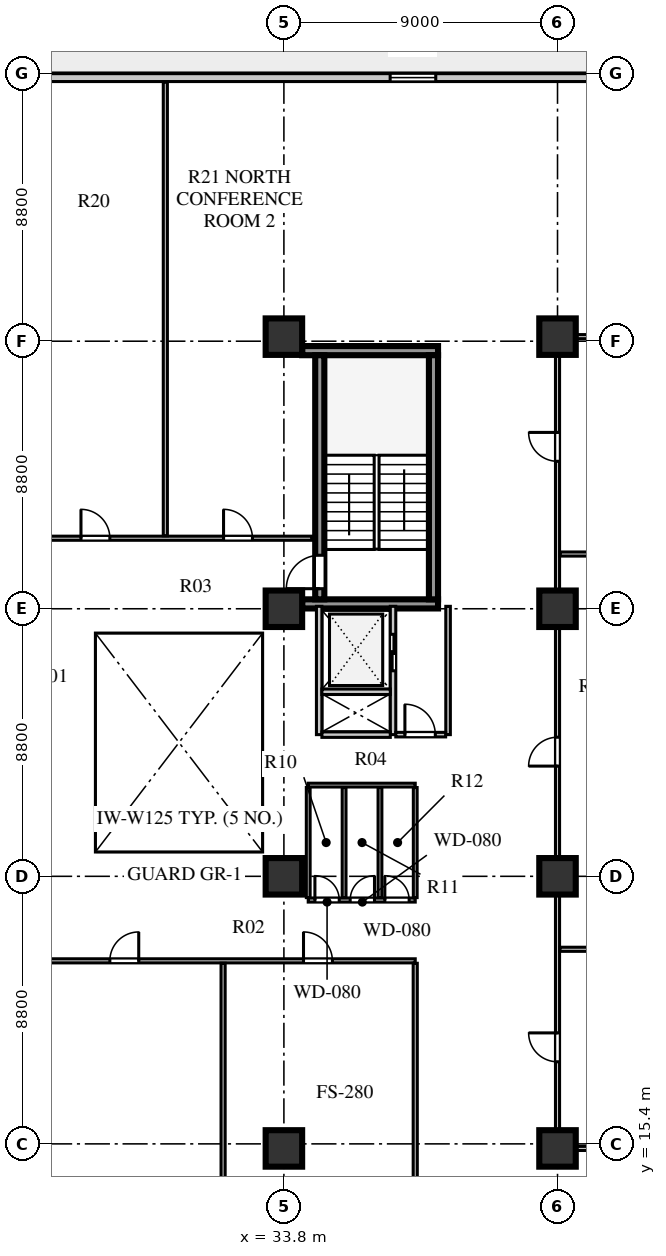
"""IFC4 building model, lengths in metres.
Left out: names, types, materials, properties, quantities, classifications, styles, units other than length and angle.
Written with IfcOpenShell. Run it as: python <this file> out.ifc"""

import sys

from ifc_helpers import new_model, si_unit, direction, frame, frame_2d, origin, origin_2d, place, context, subcontext, project, spatial, rectangle, extrude, element, fill, save


model = new_model("IFC4")
c1 = context("Model", 3, precision=1e-05, world=origin(), true_north=direction((0.0, 1.0)))
c2 = subcontext(c1, "Body", "Model", "MODEL_VIEW")
j1 = project(units=[si_unit("LENGTHUNIT", "METRE"), si_unit("PLANEANGLEUNIT", "RADIAN")], contexts=[c1])
p1 = place(None, origin())
s1 = spatial("IfcSite", under=j1, at=p1, CompositionType="ELEMENT")
p2 = place(p1, origin())
s2 = spatial("IfcBuilding", under=s1, at=p2, CompositionType="ELEMENT")
p3 = place(p2, frame((0.0, 0.0, 42.0)))
s3 = spatial("IfcBuildingStorey", under=s2, at=p3, CompositionType="ELEMENT", Elevation=42.0)
for number, where, z_axis, x_axis in (
    (1, (34.4, 33.16, 0.0), (0.0, 0.0, 1.0), (1.0, 0.0, 0.0)),
    (2, (34.4, 41.49, 0.0), (0.0, 0.0, 1.0), (1.0, 0.0, 0.0)),
):
    element("IfcWall", number, at=place(p3, frame(where, z_axis=z_axis, x_axis=x_axis)), inside=s3, PredefinedType="SHEAR", context=c2, shape_type="SweptSolid", body=[
        extrude(rectangle(XDim=4.47, YDim=0.3, at=frame_2d((2.235, 0.0))), origin(), (0.0, 0.0, 1.0), 3.72),
    ])
p4 = place(p3, frame((34.98, 33.31, 0.0), z_axis=(0.0, 0.0, 1.0), x_axis=(0.0, 1.0, 0.0)))
e3 = element("IfcWall", 3, at=p4, inside=s3, PredefinedType="SHEAR", context=c2, shape_type="SweptSolid", body=[
    extrude(rectangle(XDim=8.03, YDim=0.3, at=frame_2d((4.015, 0.0))), origin(), (0.0, 0.0, 1.0), 3.72),
])
p5 = place(p4, frame((0.35, 0.0, 0.0)))
e4 = element("IfcOpeningElement", 4, at=p5, cuts=e3, PredefinedType="OPENING", context=c2, shape_type="SweptSolid", body=[
    extrude(rectangle(XDim=1.1, YDim=2.1, at=frame_2d((0.55, 1.05))), frame((0.0, 0.16, 0.0), z_axis=(0.0, -1.0, 0.0), x_axis=(1.0, 0.0, 0.0)), (0.0, 0.0, 1.0), 0.32),
])
p6 = place(p3, frame((38.72, 33.31, 0.0), z_axis=(0.0, 0.0, 1.0), x_axis=(0.0, 1.0, 0.0)))
e5 = element("IfcWall", 5, at=p6, inside=s3, PredefinedType="SHEAR", context=c2, shape_type="SweptSolid", body=[
    extrude(rectangle(XDim=8.03, YDim=0.3, at=frame_2d((4.015, 0.0))), origin(), (0.0, 0.0, 1.0), 3.72),
])
for number, where, z_axis, x_axis in (
    (6, (33.8, 15.25, 0.0), (0.0, 0.0, 1.0), (1.0, 0.0, 0.0)),
    (7, (33.8, 24.2, 0.0), (0.0, 0.0, 1.0), (1.0, 0.0, 0.0)),
    (8, (33.8, 33.0, 0.0), (0.0, 0.0, 1.0), (1.0, 0.0, 0.0)),
    (9, (33.8, 41.95, 0.0), (0.0, 0.0, 1.0), (1.0, 0.0, 0.0)),
    (10, (42.8, 15.25, 0.0), (0.0, 0.0, 1.0), (1.0, 0.0, 0.0)),
    (11, (42.8, 24.2, 0.0), (0.0, 0.0, 1.0), (1.0, 0.0, 0.0)),
    (12, (42.8, 33.0, 0.0), (0.0, 0.0, 1.0), (1.0, 0.0, 0.0)),
    (13, (42.8, 41.95, 0.0), (0.0, 0.0, 1.0), (1.0, 0.0, 0.0)),
):
    element("IfcColumn", number, at=place(p3, frame(where, z_axis=z_axis, x_axis=x_axis)), inside=s3, PredefinedType="COLUMN", context=c2, shape_type="SweptSolid", body=[
        extrude(rectangle(XDim=1.2, YDim=1.2, at=origin_2d()), origin(), (0.0, 0.0, 1.0), 3.72),
    ])
p7 = place(p3, frame((46.3, 50.47, 0.0), z_axis=(0.0, 0.0, 1.0), x_axis=(-1.0, 0.0, 0.0)))
e14 = element("IfcWall", 14, at=p7, inside=s3, PredefinedType="SOLIDWALL", context=c2, shape_type="SweptSolid", body=[
    extrude(rectangle(XDim=34.0, YDim=0.26, at=frame_2d((17.0, 0.0))), origin(), (0.0, 0.0, 1.0), 3.72),
])
p8 = place(p7, frame((32.05, 0.0, 0.0)))
e15 = element("IfcOpeningElement", 15, at=p8, cuts=e14, PredefinedType="OPENING", context=c2, shape_type="SweptSolid", body=[
    extrude(rectangle(XDim=1.0, YDim=2.05, at=frame_2d((0.5, 1.025))), frame((0.0, 0.14, 0.0), z_axis=(0.0, -1.0, 0.0), x_axis=(1.0, 0.0, 0.0)), (0.0, 0.0, 1.0), 0.28),
])
p9 = place(p7, frame((23.47, 0.0, 0.8)))
e16 = element("IfcOpeningElement", 16, at=p9, cuts=e14, PredefinedType="OPENING", context=c2, shape_type="SweptSolid", body=[
    extrude(rectangle(XDim=1.8, YDim=2.0, at=frame_2d((0.9, 1.0))), frame((0.0, 0.14, 0.0), z_axis=(0.0, -1.0, 0.0), x_axis=(1.0, 0.0, 0.0)), (0.0, 0.0, 1.0), 0.28),
])
p10 = place(p7, frame((7.505, 0.0, 0.8)))
e17 = element("IfcOpeningElement", 17, at=p10, cuts=e14, PredefinedType="OPENING", context=c2, shape_type="SweptSolid", body=[
    extrude(rectangle(XDim=1.5, YDim=2.0, at=frame_2d((0.75, 1.0))), frame((0.0, 0.14, 0.0), z_axis=(0.0, -1.0, 0.0), x_axis=(1.0, 0.0, 0.0)), (0.0, 0.0, 1.0), 0.28),
])
p11 = place(p3, frame((34.96, 28.86, 0.0), z_axis=(0.0, 0.0, 1.0), x_axis=(0.0, 1.0, 0.0)))
e18 = element("IfcWall", 18, at=p11, inside=s3, PredefinedType="SOLIDWALL", context=c2, shape_type="SweptSolid", body=[
    extrude(rectangle(XDim=4.22, YDim=0.18, at=frame_2d((2.11, 0.0))), origin(), (0.0, 0.0, 1.0), 3.72),
])
p12 = place(p3, frame((37.39, 28.86, 0.0), z_axis=(0.0, 0.0, 1.0), x_axis=(0.0, 1.0, 0.0)))
e19 = element("IfcWall", 19, at=p12, inside=s3, PredefinedType="SOLIDWALL", context=c2, shape_type="SweptSolid", body=[
    extrude(rectangle(XDim=4.22, YDim=0.18, at=frame_2d((2.11, 0.0))), origin(), (0.0, 0.0, 1.0), 3.72),
])
p13 = place(p12, frame((2.1, 0.0, 0.0)))
e20 = element("IfcOpeningElement", 20, at=p13, cuts=e19, PredefinedType="OPENING", context=c2, shape_type="SweptSolid", body=[
    extrude(rectangle(XDim=1.2, YDim=2.12, at=frame_2d((0.6, 1.06))), frame((0.0, 0.1, 0.0), z_axis=(0.0, -1.0, 0.0), x_axis=(1.0, 0.0, 0.0)), (0.0, 0.0, 1.0), 0.2),
])
for number, where, z_axis, x_axis in (
    (21, (35.05, 28.86, 0.0), (0.0, 0.0, 1.0), (1.0, 0.0, 0.0)),
    (22, (35.05, 30.27, 0.0), (0.0, 0.0, 1.0), (1.0, 0.0, 0.0)),
):
    element("IfcWall", number, at=place(p3, frame(where, z_axis=z_axis, x_axis=x_axis)), inside=s3, PredefinedType="SOLIDWALL", context=c2, shape_type="SweptSolid", body=[
        extrude(rectangle(XDim=2.25, YDim=0.18, at=frame_2d((1.125, 0.0))), origin(), (0.0, 0.0, 1.0), 3.72),
    ])
p14 = place(p3, frame((39.2, 28.86, 0.0), z_axis=(0.0, 0.0, 1.0), x_axis=(0.0, 1.0, 0.0)))
e23 = element("IfcWall", 23, at=p14, inside=s3, PredefinedType="PARTITIONING", context=c2, shape_type="SweptSolid", body=[
    extrude(rectangle(XDim=4.22, YDim=0.15, at=frame_2d((2.11, 0.0))), origin(), (0.0, 0.0, 1.0), 3.72),
])
p15 = place(p3, frame((37.48, 28.86, 0.0), z_axis=(0.0, 0.0, 1.0), x_axis=(1.0, 0.0, 0.0)))
e24 = element("IfcWall", 24, at=p15, inside=s3, PredefinedType="PARTITIONING", context=c2, shape_type="SweptSolid", body=[
    extrude(rectangle(XDim=1.64, YDim=0.15, at=frame_2d((0.82, 0.0))), origin(), (0.0, 0.0, 1.0), 3.72),
])
p16 = place(p15, frame((0.3, 0.0, 0.0)))
e25 = element("IfcOpeningElement", 25, at=p16, cuts=e24, PredefinedType="OPENING", context=c2, shape_type="SweptSolid", body=[
    extrude(rectangle(XDim=1.0, YDim=2.1, at=frame_2d((0.5, 1.05))), frame((0.0, 0.085, 0.0), z_axis=(0.0, -1.0, 0.0), x_axis=(1.0, 0.0, 0.0)), (0.0, 0.0, 1.0), 0.17),
])
p17 = place(p3, frame((25.25, 21.42, 0.0), z_axis=(0.0, 0.0, 1.0), x_axis=(1.0, 0.0, 0.0)))
e26 = element("IfcWall", 26, at=p17, inside=s3, PredefinedType="PARTITIONING", context=c2, shape_type="SweptSolid", body=[
    extrude(rectangle(XDim=12.87, YDim=0.135, at=frame_2d((6.435, 0.0))), origin(), (0.0, 0.0, 1.0), 3.32),
])
p18 = place(p17, frame((2.825, 0.0, 0.0)))
e27 = element("IfcOpeningElement", 27, at=p18, cuts=e26, PredefinedType="OPENING", context=c2, shape_type="SweptSolid", body=[
    extrude(rectangle(XDim=0.95, YDim=2.08, at=frame_2d((0.475, 1.04))), frame((0.0, 0.078, 0.0), z_axis=(0.0, -1.0, 0.0), x_axis=(1.0, 0.0, 0.0)), (0.0, 0.0, 1.0), 0.155),
])
p19 = place(p17, frame((9.195, 0.0, 0.0)))
e28 = element("IfcOpeningElement", 28, at=p19, cuts=e26, PredefinedType="OPENING", context=c2, shape_type="SweptSolid", body=[
    extrude(rectangle(XDim=0.95, YDim=2.08, at=frame_2d((0.475, 1.04))), frame((0.0, 0.078, 0.0), z_axis=(0.0, -1.0, 0.0), x_axis=(1.0, 0.0, 0.0)), (0.0, 0.0, 1.0), 0.155),
])
p20 = place(p3, frame((38.12, 6.88, 0.0), z_axis=(0.0, 0.0, 1.0), x_axis=(0.0, 1.0, 0.0)))
e29 = element("IfcWall", 29, at=p20, inside=s3, PredefinedType="PARTITIONING", context=c2, shape_type="SweptSolid", body=[
    extrude(rectangle(XDim=14.46, YDim=0.135, at=frame_2d((7.23, 0.0))), origin(), (0.0, 0.0, 1.0), 3.72),
])
p21 = place(p3, frame((34.6, 23.42, 0.0), z_axis=(0.0, 0.0, 1.0), x_axis=(1.0, 0.0, 0.0)))
e30 = element("IfcWall", 30, at=p21, inside=s3, PredefinedType="PARTITIONING", context=c2, shape_type="SweptSolid", body=[
    extrude(rectangle(XDim=3.52, YDim=0.135, at=frame_2d((1.76, 0.0))), origin(), (0.0, 0.0, 1.0), 3.72),
])
p22 = place(p21, frame((0.22, 0.0, 0.0)))
e31 = element("IfcOpeningElement", 31, at=p22, cuts=e30, PredefinedType="OPENING", context=c2, shape_type="SweptSolid", body=[
    extrude(rectangle(XDim=0.8, YDim=2.05, at=frame_2d((0.4, 1.025))), frame((0.0, 0.078, 0.0), z_axis=(0.0, -1.0, 0.0), x_axis=(1.0, 0.0, 0.0)), (0.0, 0.0, 1.0), 0.155),
])
p23 = place(p21, frame((1.38, 0.0, 0.0)))
e32 = element("IfcOpeningElement", 32, at=p23, cuts=e30, PredefinedType="OPENING", context=c2, shape_type="SweptSolid", body=[
    extrude(rectangle(XDim=0.8, YDim=2.05, at=frame_2d((0.4, 1.025))), frame((0.0, 0.078, 0.0), z_axis=(0.0, -1.0, 0.0), x_axis=(1.0, 0.0, 0.0)), (0.0, 0.0, 1.0), 0.155),
])
p24 = place(p21, frame((2.52, 0.0, 0.0)))
e33 = element("IfcOpeningElement", 33, at=p24, cuts=e30, PredefinedType="OPENING", context=c2, shape_type="SweptSolid", body=[
    extrude(rectangle(XDim=0.8, YDim=2.05, at=frame_2d((0.4, 1.025))), frame((0.0, 0.078, 0.0), z_axis=(0.0, -1.0, 0.0), x_axis=(1.0, 0.0, 0.0)), (0.0, 0.0, 1.0), 0.155),
])
p25 = place(p3, frame((25.25, 35.32, 0.0), z_axis=(0.0, 0.0, 1.0), x_axis=(1.0, 0.0, 0.0)))
e34 = element("IfcWall", 34, at=p25, inside=s3, PredefinedType="PARTITIONING", context=c2, shape_type="SweptSolid", body=[
    extrude(rectangle(XDim=9.47, YDim=0.135, at=frame_2d((4.735, 0.0))), origin(), (0.0, 0.0, 1.0), 3.72),
])
p26 = place(p25, frame((1.875, 0.0, 0.0)))
e35 = element("IfcOpeningElement", 35, at=p26, cuts=e34, PredefinedType="OPENING", context=c2, shape_type="SweptSolid", body=[
    extrude(rectangle(XDim=0.95, YDim=2.08, at=frame_2d((0.475, 1.04))), frame((0.0, 0.078, 0.0), z_axis=(0.0, -1.0, 0.0), x_axis=(1.0, 0.0, 0.0)), (0.0, 0.0, 1.0), 0.155),
])
p27 = place(p25, frame((6.565, 0.0, 0.0)))
e36 = element("IfcOpeningElement", 36, at=p27, cuts=e34, PredefinedType="OPENING", context=c2, shape_type="SweptSolid", body=[
    extrude(rectangle(XDim=0.95, YDim=2.08, at=frame_2d((0.475, 1.04))), frame((0.0, 0.078, 0.0), z_axis=(0.0, -1.0, 0.0), x_axis=(1.0, 0.0, 0.0)), (0.0, 0.0, 1.0), 0.155),
])
p28 = place(p3, frame((42.8, 15.25, 0.0), z_axis=(0.0, 0.0, 1.0), x_axis=(0.0, 1.0, 0.0)))
e37 = element("IfcWall", 37, at=p28, inside=s3, PredefinedType="PARTITIONING", context=c2, shape_type="SweptSolid", body=[
    extrude(rectangle(XDim=26.7, YDim=0.135, at=frame_2d((13.35, 0.0))), origin(), (0.0, 0.0, 1.0), 3.02),
])
p29 = place(p28, frame((2.85, 0.0, 0.0)))
e38 = element("IfcOpeningElement", 38, at=p29, cuts=e37, PredefinedType="OPENING", context=c2, shape_type="SweptSolid", body=[
    extrude(rectangle(XDim=0.95, YDim=2.08, at=frame_2d((0.475, 1.04))), frame((0.0, 0.078, 0.0), z_axis=(0.0, -1.0, 0.0), x_axis=(1.0, 0.0, 0.0)), (0.0, 0.0, 1.0), 0.155),
])
p30 = place(p28, frame((12.575, 0.0, 0.0)))
e39 = element("IfcOpeningElement", 39, at=p30, cuts=e37, PredefinedType="OPENING", context=c2, shape_type="SweptSolid", body=[
    extrude(rectangle(XDim=0.95, YDim=2.08, at=frame_2d((0.475, 1.04))), frame((0.0, 0.078, 0.0), z_axis=(0.0, -1.0, 0.0), x_axis=(1.0, 0.0, 0.0)), (0.0, 0.0, 1.0), 0.155),
])
p31 = place(p28, frame((22.6, 0.0, 0.0)))
e40 = element("IfcOpeningElement", 40, at=p31, cuts=e37, PredefinedType="OPENING", context=c2, shape_type="SweptSolid", body=[
    extrude(rectangle(XDim=0.95, YDim=2.08, at=frame_2d((0.475, 1.04))), frame((0.0, 0.078, 0.0), z_axis=(0.0, -1.0, 0.0), x_axis=(1.0, 0.0, 0.0)), (0.0, 0.0, 1.0), 0.155),
])
for number, where, z_axis, x_axis in (
    (41, (42.88, 15.25, 0.0), (0.0, 0.0, 1.0), (1.0, 0.0, 0.0)),
    (42, (42.88, 41.95, 0.0), (0.0, 0.0, 1.0), (1.0, 0.0, 0.0)),
):
    element("IfcWall", number, at=place(p3, frame(where, z_axis=z_axis, x_axis=x_axis)), inside=s3, PredefinedType="PARTITIONING", context=c2, shape_type="SweptSolid", body=[
        extrude(rectangle(XDim=8.64, YDim=0.135, at=frame_2d((4.32, 0.0))), origin(), (0.0, 0.0, 1.0), 3.22),
    ])
p32 = place(p3, frame((34.6, 27.2, 0.0), z_axis=(0.0, 0.0, 1.0), x_axis=(1.0, 0.0, 0.0)))
e43 = element("IfcWall", 43, at=p32, inside=s3, PredefinedType="PLUMBINGWALL", context=c2, shape_type="SweptSolid", body=[
    extrude(rectangle(XDim=3.52, YDim=0.125, at=frame_2d((1.76, 0.0))), origin(), (0.0, 0.0, 1.0), 3.32),
])
for number, where, z_axis, x_axis in (
    (44, (34.6, 23.5, 0.0), (0.0, 0.0, 1.0), (0.0, 1.0, 0.0)),
    (45, (38.12, 23.5, 0.0), (0.0, 0.0, 1.0), (0.0, 1.0, 0.0)),
    (46, (35.78, 23.5, 0.0), (0.0, 0.0, 1.0), (0.0, 1.0, 0.0)),
    (47, (36.96, 23.5, 0.0), (0.0, 0.0, 1.0), (0.0, 1.0, 0.0)),
):
    element("IfcWall", number, at=place(p3, frame(where, z_axis=z_axis, x_axis=x_axis)), inside=s3, PredefinedType="PLUMBINGWALL", context=c2, shape_type="SweptSolid", body=[
        extrude(rectangle(XDim=3.62, YDim=0.125, at=frame_2d((1.81, 0.0))), origin(), (0.0, 0.0, 1.0), 3.72),
    ])
p33 = place(p3, frame((31.8, 6.88, 0.0), z_axis=(0.0, 0.0, 1.0), x_axis=(0.0, 1.0, 0.0)))
e48 = element("IfcWall", 48, at=p33, inside=s3, PredefinedType="PARTITIONING", context=c2, shape_type="SweptSolid", body=[
    extrude(rectangle(XDim=14.46, YDim=0.135, at=frame_2d((7.23, 0.0))), origin(), (0.0, 0.0, 1.0), 3.72),
])
for number, where, z_axis, x_axis in (
    (49, (42.88, 21.8, 0.0), (0.0, 0.0, 1.0), (1.0, 0.0, 0.0)),
    (50, (42.88, 34.8, 0.0), (0.0, 0.0, 1.0), (1.0, 0.0, 0.0)),
):
    element("IfcWall", number, at=place(p3, frame(where, z_axis=z_axis, x_axis=x_axis)), inside=s3, PredefinedType="PARTITIONING", context=c2, shape_type="SweptSolid", body=[
        extrude(rectangle(XDim=8.64, YDim=0.135, at=frame_2d((4.32, 0.0))), origin(), (0.0, 0.0, 1.0), 3.72),
    ])
p34 = place(p3, frame((29.9, 35.4, 0.0), z_axis=(0.0, 0.0, 1.0), x_axis=(0.0, 1.0, 0.0)))
e51 = element("IfcWall", 51, at=p34, inside=s3, PredefinedType="PARTITIONING", context=c2, shape_type="SweptSolid", body=[
    extrude(rectangle(XDim=14.92, YDim=0.135, at=frame_2d((7.46, 0.0))), origin(), (0.0, 0.0, 1.0), 3.72),
])
p35 = place(p10, origin())
e52 = element("IfcWindow", 52, at=p35, inside=s3, PartitioningType="SINGLE_PANEL", PredefinedType="WINDOW", context=c2, shape_type="SweptSolid", body=[
    extrude(rectangle(XDim=1.5, YDim=2.0, at=frame_2d((0.75, 1.0))), frame((0.0, 0.03, 0.0), z_axis=(0.0, -1.0, 0.0), x_axis=(1.0, 0.0, 0.0)), (0.0, 0.0, 1.0), 0.06),
])
fill(e17, e52)
p36 = place(p5, origin())
e53 = element("IfcDoor", 53, at=p36, inside=s3, OperationType="SINGLE_SWING_LEFT", PredefinedType="DOOR", context=c2, shape_type="SweptSolid", body=[
    extrude(rectangle(XDim=1.1, YDim=2.1, at=frame_2d((0.55, 1.05))), frame((0.0, 0.025, 0.0), z_axis=(0.0, -1.0, 0.0), x_axis=(1.0, 0.0, 0.0)), (0.0, 0.0, 1.0), 0.05),
])
fill(e4, e53)
p37 = place(p13, frame((1.2, 0.0, 0.0), z_axis=(0.0, 0.0, 1.0), x_axis=(-1.0, 0.0, 0.0)))
e54 = element("IfcDoor", 54, at=p37, inside=s3, OperationType="DOUBLE_DOOR_SLIDING", PredefinedType="DOOR", context=c2, shape_type="SweptSolid", body=[
    extrude(rectangle(XDim=1.2, YDim=2.12, at=frame_2d((0.6, 1.06))), frame((0.0, 0.025, 0.0), z_axis=(0.0, -1.0, 0.0), x_axis=(1.0, 0.0, 0.0)), (0.0, 0.0, 1.0), 0.05),
])
fill(e20, e54)
p38 = place(p16, origin())
e55 = element("IfcDoor", 55, at=p38, inside=s3, OperationType="SINGLE_SWING_LEFT", PredefinedType="DOOR", context=c2, shape_type="SweptSolid", body=[
    extrude(rectangle(XDim=1.0, YDim=2.1, at=frame_2d((0.5, 1.05))), frame((0.0, 0.025, 0.0), z_axis=(0.0, -1.0, 0.0), x_axis=(1.0, 0.0, 0.0)), (0.0, 0.0, 1.0), 0.05),
])
fill(e25, e55)
p39 = place(p22, origin())
e56 = element("IfcDoor", 56, at=p39, inside=s3, OperationType="SINGLE_SWING_LEFT", PredefinedType="DOOR", context=c2, shape_type="SweptSolid", body=[
    extrude(rectangle(XDim=0.8, YDim=2.05, at=frame_2d((0.4, 1.025))), frame((0.0, 0.025, 0.0), z_axis=(0.0, -1.0, 0.0), x_axis=(1.0, 0.0, 0.0)), (0.0, 0.0, 1.0), 0.05),
])
fill(e31, e56)
p40 = place(p23, origin())
e57 = element("IfcDoor", 57, at=p40, inside=s3, OperationType="SINGLE_SWING_RIGHT", PredefinedType="DOOR", context=c2, shape_type="SweptSolid", body=[
    extrude(rectangle(XDim=0.8, YDim=2.05, at=frame_2d((0.4, 1.025))), frame((0.0, 0.025, 0.0), z_axis=(0.0, -1.0, 0.0), x_axis=(1.0, 0.0, 0.0)), (0.0, 0.0, 1.0), 0.05),
])
fill(e32, e57)
p41 = place(p24, origin())
e58 = element("IfcDoor", 58, at=p41, inside=s3, OperationType="SINGLE_SWING_LEFT", PredefinedType="DOOR", context=c2, shape_type="SweptSolid", body=[
    extrude(rectangle(XDim=0.8, YDim=2.05, at=frame_2d((0.4, 1.025))), frame((0.0, 0.025, 0.0), z_axis=(0.0, -1.0, 0.0), x_axis=(1.0, 0.0, 0.0)), (0.0, 0.0, 1.0), 0.05),
])
fill(e33, e58)
p42 = place(p18, frame((0.95, 0.0, 0.0), z_axis=(0.0, 0.0, 1.0), x_axis=(-1.0, 0.0, 0.0)))
e59 = element("IfcDoor", 59, at=p42, inside=s3, OperationType="SINGLE_SWING_LEFT", PredefinedType="DOOR", context=c2, shape_type="SweptSolid", body=[
    extrude(rectangle(XDim=0.95, YDim=2.08, at=frame_2d((0.475, 1.04))), frame((0.0, 0.025, 0.0), z_axis=(0.0, -1.0, 0.0), x_axis=(1.0, 0.0, 0.0)), (0.0, 0.0, 1.0), 0.05),
])
fill(e27, e59)
p43 = place(p19, frame((0.95, 0.0, 0.0), z_axis=(0.0, 0.0, 1.0), x_axis=(-1.0, 0.0, 0.0)))
e60 = element("IfcDoor", 60, at=p43, inside=s3, OperationType="SINGLE_SWING_RIGHT", PredefinedType="DOOR", context=c2, shape_type="SweptSolid", body=[
    extrude(rectangle(XDim=0.95, YDim=2.08, at=frame_2d((0.475, 1.04))), frame((0.0, 0.025, 0.0), z_axis=(0.0, -1.0, 0.0), x_axis=(1.0, 0.0, 0.0)), (0.0, 0.0, 1.0), 0.05),
])
fill(e28, e60)
p44 = place(p29, origin())
e61 = element("IfcDoor", 61, at=p44, inside=s3, OperationType="SINGLE_SWING_RIGHT", PredefinedType="DOOR", context=c2, shape_type="SweptSolid", body=[
    extrude(rectangle(XDim=0.95, YDim=2.08, at=frame_2d((0.475, 1.04))), frame((0.0, 0.025, 0.0), z_axis=(0.0, -1.0, 0.0), x_axis=(1.0, 0.0, 0.0)), (0.0, 0.0, 1.0), 0.05),
])
fill(e38, e61)
p45 = place(p30, origin())
e62 = element("IfcDoor", 62, at=p45, inside=s3, OperationType="SINGLE_SWING_LEFT", PredefinedType="DOOR", context=c2, shape_type="SweptSolid", body=[
    extrude(rectangle(XDim=0.95, YDim=2.08, at=frame_2d((0.475, 1.04))), frame((0.0, 0.025, 0.0), z_axis=(0.0, -1.0, 0.0), x_axis=(1.0, 0.0, 0.0)), (0.0, 0.0, 1.0), 0.05),
])
fill(e39, e62)
p46 = place(p31, origin())
e63 = element("IfcDoor", 63, at=p46, inside=s3, OperationType="SINGLE_SWING_RIGHT", PredefinedType="DOOR", context=c2, shape_type="SweptSolid", body=[
    extrude(rectangle(XDim=0.95, YDim=2.08, at=frame_2d((0.475, 1.04))), frame((0.0, 0.025, 0.0), z_axis=(0.0, -1.0, 0.0), x_axis=(1.0, 0.0, 0.0)), (0.0, 0.0, 1.0), 0.05),
])
fill(e40, e63)
p47 = place(p26, origin())
e64 = element("IfcDoor", 64, at=p47, inside=s3, OperationType="SINGLE_SWING_LEFT", PredefinedType="DOOR", context=c2, shape_type="SweptSolid", body=[
    extrude(rectangle(XDim=0.95, YDim=2.08, at=frame_2d((0.475, 1.04))), frame((0.0, 0.025, 0.0), z_axis=(0.0, -1.0, 0.0), x_axis=(1.0, 0.0, 0.0)), (0.0, 0.0, 1.0), 0.05),
])
fill(e35, e64)
p48 = place(p27, origin())
e65 = element("IfcDoor", 65, at=p48, inside=s3, OperationType="SINGLE_SWING_LEFT", PredefinedType="DOOR", context=c2, shape_type="SweptSolid", body=[
    extrude(rectangle(XDim=0.95, YDim=2.08, at=frame_2d((0.475, 1.04))), frame((0.0, 0.025, 0.0), z_axis=(0.0, -1.0, 0.0), x_axis=(1.0, 0.0, 0.0)), (0.0, 0.0, 1.0), 0.05),
])
fill(e36, e65)
save(model, sys.argv[1])
